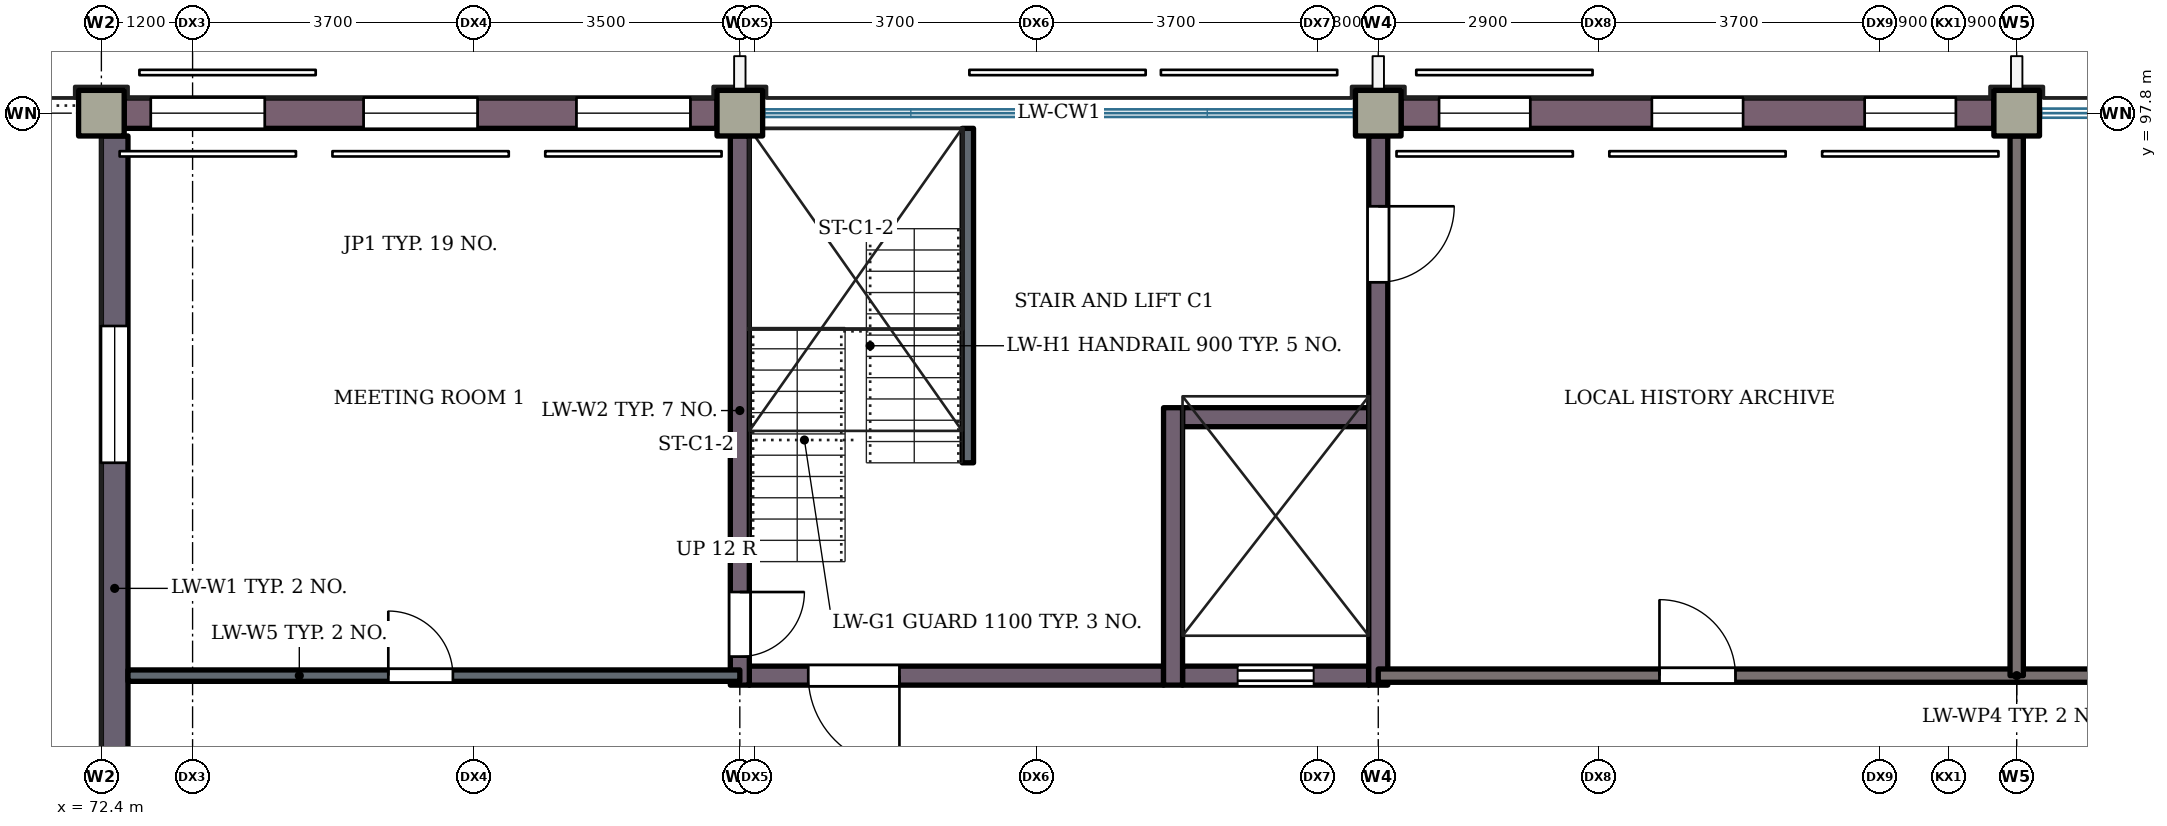
"""IFC4 building model, lengths in metres.
Left out: names, types, materials, properties, quantities, classifications, styles, units other than length and angle.
Written with IfcOpenShell. Run it as: python <this file> out.ifc"""

import sys

from ifc_helpers import new_model, si_unit, direction, frame, frame_2d, origin, origin_2d, place, context, subcontext, project, spatial, rectangle, extrude, element, fill, save


model = new_model("IFC4")
c1 = context("Model", 3, precision=1e-05, world=origin(), true_north=direction((0.0, 1.0)))
c2 = subcontext(c1, "Body", "Model", "MODEL_VIEW")
j1 = project(units=[si_unit("LENGTHUNIT", "METRE"), si_unit("PLANEANGLEUNIT", "RADIAN")], contexts=[c1])
p1 = place(None, origin())
s1 = spatial("IfcSite", under=j1, at=p1, CompositionType="ELEMENT")
p2 = place(p1, origin())
s2 = spatial("IfcBuilding", under=s1, at=p2, CompositionType="ELEMENT")
p3 = place(p2, frame((0.0, 0.0, 8.4)))
s3 = spatial("IfcBuildingStorey", under=s2, at=p3, CompositionType="ELEMENT", Elevation=8.4)
for number, where, z_axis, x_axis in (
    (1, (72.4, 97.8, 0.0), (0.0, 0.0, 1.0), (1.0, 0.0, 0.0)),
    (2, (80.8, 97.8, 0.0), (0.0, 0.0, 1.0), (1.0, 0.0, 0.0)),
    (3, (89.2, 97.8, 0.0), (0.0, 0.0, 1.0), (1.0, 0.0, 0.0)),
    (4, (97.6, 97.8, 0.0), (0.0, 0.0, 1.0), (1.0, 0.0, 0.0)),
):
    element("IfcColumn", number, at=place(p3, frame(where, z_axis=z_axis, x_axis=x_axis)), inside=s3, PredefinedType="COLUMN", context=c2, shape_type="SweptSolid", body=[
        extrude(rectangle(XDim=0.6, YDim=0.6, at=origin_2d()), origin(), (0.0, 0.0, 1.0), 4.2),
    ])
p4 = place(p3, frame((80.925, 90.4, 0.0), z_axis=(0.0, 0.0, 1.0), x_axis=(1.0, 0.0, 0.0)))
e5 = element("IfcWall", 5, at=p4, inside=s3, PredefinedType="SHEAR", context=c2, shape_type="SweptSolid", body=[
    extrude(rectangle(XDim=5.45, YDim=0.25, at=frame_2d((2.725, 0.0))), origin(), (0.0, 0.0, 1.0), 4.2),
])
p5 = place(p4, frame((0.775, 0.0, 0.0)))
e6 = element("IfcOpeningElement", 6, at=p5, cuts=e5, PredefinedType="OPENING", context=c2, shape_type="SweptSolid", body=[
    extrude(rectangle(XDim=1.2, YDim=2.1, at=frame_2d((0.6, 1.05))), frame((0.0, 0.135, 0.0), z_axis=(0.0, -1.0, 0.0), x_axis=(1.0, 0.0, 0.0)), (0.0, 0.0, 1.0), 0.27),
])
p6 = place(p3, frame((86.625, 90.4, 0.0), z_axis=(0.0, 0.0, 1.0), x_axis=(1.0, 0.0, 0.0)))
e7 = element("IfcWall", 7, at=p6, inside=s3, PredefinedType="SHEAR", context=c2, shape_type="SweptSolid", body=[
    extrude(rectangle(XDim=2.45, YDim=0.25, at=frame_2d((1.225, 0.0))), origin(), (0.0, 0.0, 1.0), 4.2),
])
p7 = place(p6, frame((0.725, 0.0, 0.0)))
e8 = element("IfcOpeningElement", 8, at=p7, cuts=e7, PredefinedType="OPENING", context=c2, shape_type="SweptSolid", body=[
    extrude(rectangle(XDim=1.0, YDim=2.1, at=frame_2d((0.5, 1.05))), frame((0.0, 0.135, 0.0), z_axis=(0.0, -1.0, 0.0), x_axis=(1.0, 0.0, 0.0)), (0.0, 0.0, 1.0), 0.27),
])
p8 = place(p3, frame((86.625, 93.8, 0.0), z_axis=(0.0, 0.0, 1.0), x_axis=(1.0, 0.0, 0.0)))
e9 = element("IfcWall", 9, at=p8, inside=s3, PredefinedType="SHEAR", context=c2, shape_type="SweptSolid", body=[
    extrude(rectangle(XDim=2.45, YDim=0.25, at=frame_2d((1.225, 0.0))), origin(), (0.0, 0.0, 1.0), 4.2),
])
p9 = place(p3, frame((72.575, 87.9, 0.0), z_axis=(0.0, 0.0, 1.0), x_axis=(0.0, 1.0, 0.0)))
e10 = element("IfcWall", 10, at=p9, inside=s3, PredefinedType="SHEAR", context=c2, shape_type="SweptSolid", body=[
    extrude(rectangle(XDim=9.6, YDim=0.35, at=frame_2d((4.8, 0.0))), origin(), (0.0, 0.0, 1.0), 4.2),
])
p10 = place(p9, frame((5.3, 0.0, 0.9)))
e11 = element("IfcOpeningElement", 11, at=p10, cuts=e10, PredefinedType="OPENING", context=c2, shape_type="SweptSolid", body=[
    extrude(rectangle(XDim=1.8, YDim=2.1, at=frame_2d((0.9, 1.05))), frame((0.0, 0.185, 0.0), z_axis=(0.0, -1.0, 0.0), x_axis=(1.0, 0.0, 0.0)), (0.0, 0.0, 1.0), 0.37),
])
p11 = place(p3, frame((80.8, 90.275, 0.0), z_axis=(0.0, 0.0, 1.0), x_axis=(0.0, 1.0, 0.0)))
e12 = element("IfcWall", 12, at=p11, inside=s3, PredefinedType="SHEAR", context=c2, shape_type="SweptSolid", body=[
    extrude(rectangle(XDim=7.225, YDim=0.25, at=frame_2d((3.613, 0.0))), origin(), (0.0, 0.0, 1.0), 4.2),
])
p12 = place(p11, frame((0.375, 0.0, 0.0)))
e13 = element("IfcOpeningElement", 13, at=p12, cuts=e12, PredefinedType="OPENING", context=c2, shape_type="SweptSolid", body=[
    extrude(rectangle(XDim=0.85, YDim=2.1, at=frame_2d((0.425, 1.05))), frame((0.0, 0.135, 0.0), z_axis=(0.0, -1.0, 0.0), x_axis=(1.0, 0.0, 0.0)), (0.0, 0.0, 1.0), 0.27),
])
p13 = place(p3, frame((86.5, 90.275, 0.0), z_axis=(0.0, 0.0, 1.0), x_axis=(0.0, 1.0, 0.0)))
e14 = element("IfcWall", 14, at=p13, inside=s3, PredefinedType="SHEAR", context=c2, shape_type="SweptSolid", body=[
    extrude(rectangle(XDim=3.65, YDim=0.25, at=frame_2d((1.825, 0.0))), origin(), (0.0, 0.0, 1.0), 4.2),
])
p14 = place(p3, frame((89.2, 90.275, 0.0), z_axis=(0.0, 0.0, 1.0), x_axis=(0.0, 1.0, 0.0)))
e15 = element("IfcWall", 15, at=p14, inside=s3, PredefinedType="SHEAR", context=c2, shape_type="SweptSolid", body=[
    extrude(rectangle(XDim=7.225, YDim=0.25, at=frame_2d((3.613, 0.0))), origin(), (0.0, 0.0, 1.0), 4.2),
])
p15 = place(p14, frame((5.3, 0.0, 0.0)))
e16 = element("IfcOpeningElement", 16, at=p15, cuts=e15, PredefinedType="OPENING", context=c2, shape_type="SweptSolid", body=[
    extrude(rectangle(XDim=1.0, YDim=2.1, at=frame_2d((0.5, 1.05))), frame((0.0, 0.135, 0.0), z_axis=(0.0, -1.0, 0.0), x_axis=(1.0, 0.0, 0.0)), (0.0, 0.0, 1.0), 0.27),
])
p16 = place(p3, frame((72.7, 97.8, 0.0), z_axis=(0.0, 0.0, 1.0), x_axis=(1.0, 0.0, 0.0)))
e17 = element("IfcWall", 17, at=p16, inside=s3, PredefinedType="SOLIDWALL", context=c2, shape_type="SweptSolid", body=[
    extrude(rectangle(XDim=7.8, YDim=0.4, at=frame_2d((3.9, 0.0))), origin(), (0.0, 0.0, 1.0), 3.32),
])
p17 = place(p16, frame((0.35, 0.0, 0.9)))
e18 = element("IfcOpeningElement", 18, at=p17, cuts=e17, PredefinedType="OPENING", context=c2, shape_type="SweptSolid", body=[
    extrude(rectangle(XDim=1.5, YDim=2.1, at=frame_2d((0.75, 1.05))), frame((0.0, 0.21, 0.0), z_axis=(0.0, -1.0, 0.0), x_axis=(1.0, 0.0, 0.0)), (0.0, 0.0, 1.0), 0.42),
])
p18 = place(p16, frame((3.15, 0.0, 0.9)))
e19 = element("IfcOpeningElement", 19, at=p18, cuts=e17, PredefinedType="OPENING", context=c2, shape_type="SweptSolid", body=[
    extrude(rectangle(XDim=1.5, YDim=2.1, at=frame_2d((0.75, 1.05))), frame((0.0, 0.21, 0.0), z_axis=(0.0, -1.0, 0.0), x_axis=(1.0, 0.0, 0.0)), (0.0, 0.0, 1.0), 0.42),
])
p19 = place(p16, frame((5.95, 0.0, 0.9)))
e20 = element("IfcOpeningElement", 20, at=p19, cuts=e17, PredefinedType="OPENING", context=c2, shape_type="SweptSolid", body=[
    extrude(rectangle(XDim=1.5, YDim=2.1, at=frame_2d((0.75, 1.05))), frame((0.0, 0.21, 0.0), z_axis=(0.0, -1.0, 0.0), x_axis=(1.0, 0.0, 0.0)), (0.0, 0.0, 1.0), 0.42),
])
p20 = place(p3, frame((89.5, 97.8, 0.0), z_axis=(0.0, 0.0, 1.0), x_axis=(1.0, 0.0, 0.0)))
e21 = element("IfcWall", 21, at=p20, inside=s3, PredefinedType="SOLIDWALL", context=c2, shape_type="SweptSolid", body=[
    extrude(rectangle(XDim=7.8, YDim=0.4, at=frame_2d((3.9, 0.0))), origin(), (0.0, 0.0, 1.0), 3.32),
])
p21 = place(p20, frame((0.5, 0.0, 1.8)))
e22 = element("IfcOpeningElement", 22, at=p21, cuts=e21, PredefinedType="OPENING", context=c2, shape_type="SweptSolid", body=[
    extrude(rectangle(XDim=1.2, YDim=1.2, at=frame_2d((0.6, 0.6))), frame((0.0, 0.21, 0.0), z_axis=(0.0, -1.0, 0.0), x_axis=(1.0, 0.0, 0.0)), (0.0, 0.0, 1.0), 0.42),
])
p22 = place(p20, frame((3.3, 0.0, 1.8)))
e23 = element("IfcOpeningElement", 23, at=p22, cuts=e21, PredefinedType="OPENING", context=c2, shape_type="SweptSolid", body=[
    extrude(rectangle(XDim=1.2, YDim=1.2, at=frame_2d((0.6, 0.6))), frame((0.0, 0.21, 0.0), z_axis=(0.0, -1.0, 0.0), x_axis=(1.0, 0.0, 0.0)), (0.0, 0.0, 1.0), 0.42),
])
p23 = place(p20, frame((6.1, 0.0, 1.8)))
e24 = element("IfcOpeningElement", 24, at=p23, cuts=e21, PredefinedType="OPENING", context=c2, shape_type="SweptSolid", body=[
    extrude(rectangle(XDim=1.2, YDim=1.2, at=frame_2d((0.6, 0.6))), frame((0.0, 0.21, 0.0), z_axis=(0.0, -1.0, 0.0), x_axis=(1.0, 0.0, 0.0)), (0.0, 0.0, 1.0), 0.42),
])
p24 = place(p3, frame((89.2, 90.4, 0.0), z_axis=(0.0, 0.0, 1.0), x_axis=(1.0, 0.0, 0.0)))
e25 = element("IfcWall", 25, at=p24, inside=s3, PredefinedType="PARTITIONING", context=c2, shape_type="SweptSolid", body=[
    extrude(rectangle(XDim=16.8, YDim=0.175, at=frame_2d((8.4, 0.0))), origin(), (0.0, 0.0, 1.0), 3.92),
])
p25 = place(p24, frame((3.7, 0.0, 0.0)))
e26 = element("IfcOpeningElement", 26, at=p25, cuts=e25, PredefinedType="OPENING", context=c2, shape_type="SweptSolid", body=[
    extrude(rectangle(XDim=1.0, YDim=2.1, at=frame_2d((0.5, 1.05))), frame((0.0, 0.097, 0.0), z_axis=(0.0, -1.0, 0.0), x_axis=(1.0, 0.0, 0.0)), (0.0, 0.0, 1.0), 0.195),
])
p26 = place(p24, frame((12.1, 0.0, 0.0)))
e27 = element("IfcOpeningElement", 27, at=p26, cuts=e25, PredefinedType="OPENING", context=c2, shape_type="SweptSolid", body=[
    extrude(rectangle(XDim=1.0, YDim=2.1, at=frame_2d((0.5, 1.05))), frame((0.0, 0.097, 0.0), z_axis=(0.0, -1.0, 0.0), x_axis=(1.0, 0.0, 0.0)), (0.0, 0.0, 1.0), 0.195),
])
p27 = place(p3, frame((72.75, 90.4, 0.0), z_axis=(0.0, 0.0, 1.0), x_axis=(1.0, 0.0, 0.0)))
e28 = element("IfcWall", 28, at=p27, inside=s3, PredefinedType="PARTITIONING", context=c2, shape_type="SweptSolid", body=[
    extrude(rectangle(XDim=8.05, YDim=0.15, at=frame_2d((4.025, 0.0))), origin(), (0.0, 0.0, 1.0), 3.92),
])
p28 = place(p27, frame((3.425, 0.0, 0.0)))
e29 = element("IfcOpeningElement", 29, at=p28, cuts=e28, PredefinedType="OPENING", context=c2, shape_type="SweptSolid", body=[
    extrude(rectangle(XDim=0.85, YDim=2.1, at=frame_2d((0.425, 1.05))), frame((0.0, 0.085, 0.0), z_axis=(0.0, -1.0, 0.0), x_axis=(1.0, 0.0, 0.0)), (0.0, 0.0, 1.0), 0.17),
])
p29 = place(p3, frame((97.6, 90.4, 0.0), z_axis=(0.0, 0.0, 1.0), x_axis=(0.0, 1.0, 0.0)))
e30 = element("IfcWall", 30, at=p29, inside=s3, PredefinedType="PARTITIONING", context=c2, shape_type="SweptSolid", body=[
    extrude(rectangle(XDim=7.1, YDim=0.175, at=frame_2d((3.55, 0.0))), origin(), (0.0, 0.0, 1.0), 3.02),
])
p30 = place(p3, frame((83.8, 93.2, 0.0), z_axis=(0.0, 0.0, 1.0), x_axis=(0.0, 1.0, 0.0)))
e31 = element("IfcWall", 31, at=p30, inside=s3, PredefinedType="PARTITIONING", context=c2, shape_type="SweptSolid", body=[
    extrude(rectangle(XDim=4.4, YDim=0.15, at=frame_2d((2.2, 0.0))), origin(), (0.0, 0.0, 1.0), 3.92),
])
p31 = place(p17, origin())
e32 = element("IfcWindow", 32, at=p31, inside=s3, PartitioningType="SINGLE_PANEL", PredefinedType="WINDOW", context=c2, shape_type="SweptSolid", body=[
    extrude(rectangle(XDim=1.5, YDim=2.1, at=frame_2d((0.75, 1.05))), frame((0.0, 0.03, 0.0), z_axis=(0.0, -1.0, 0.0), x_axis=(1.0, 0.0, 0.0)), (0.0, 0.0, 1.0), 0.06),
])
fill(e18, e32)
p32 = place(p18, origin())
e33 = element("IfcWindow", 33, at=p32, inside=s3, PartitioningType="SINGLE_PANEL", PredefinedType="WINDOW", context=c2, shape_type="SweptSolid", body=[
    extrude(rectangle(XDim=1.5, YDim=2.1, at=frame_2d((0.75, 1.05))), frame((0.0, 0.03, 0.0), z_axis=(0.0, -1.0, 0.0), x_axis=(1.0, 0.0, 0.0)), (0.0, 0.0, 1.0), 0.06),
])
fill(e19, e33)
p33 = place(p19, origin())
e34 = element("IfcWindow", 34, at=p33, inside=s3, PartitioningType="SINGLE_PANEL", PredefinedType="WINDOW", context=c2, shape_type="SweptSolid", body=[
    extrude(rectangle(XDim=1.5, YDim=2.1, at=frame_2d((0.75, 1.05))), frame((0.0, 0.03, 0.0), z_axis=(0.0, -1.0, 0.0), x_axis=(1.0, 0.0, 0.0)), (0.0, 0.0, 1.0), 0.06),
])
fill(e20, e34)
p34 = place(p21, origin())
e35 = element("IfcWindow", 35, at=p34, inside=s3, PartitioningType="SINGLE_PANEL", PredefinedType="WINDOW", context=c2, shape_type="SweptSolid", body=[
    extrude(rectangle(XDim=1.2, YDim=1.2, at=frame_2d((0.6, 0.6))), frame((0.0, 0.03, 0.0), z_axis=(0.0, -1.0, 0.0), x_axis=(1.0, 0.0, 0.0)), (0.0, 0.0, 1.0), 0.06),
])
fill(e22, e35)
p35 = place(p22, origin())
e36 = element("IfcWindow", 36, at=p35, inside=s3, PartitioningType="SINGLE_PANEL", PredefinedType="WINDOW", context=c2, shape_type="SweptSolid", body=[
    extrude(rectangle(XDim=1.2, YDim=1.2, at=frame_2d((0.6, 0.6))), frame((0.0, 0.03, 0.0), z_axis=(0.0, -1.0, 0.0), x_axis=(1.0, 0.0, 0.0)), (0.0, 0.0, 1.0), 0.06),
])
fill(e23, e36)
p36 = place(p23, origin())
e37 = element("IfcWindow", 37, at=p36, inside=s3, PartitioningType="SINGLE_PANEL", PredefinedType="WINDOW", context=c2, shape_type="SweptSolid", body=[
    extrude(rectangle(XDim=1.2, YDim=1.2, at=frame_2d((0.6, 0.6))), frame((0.0, 0.03, 0.0), z_axis=(0.0, -1.0, 0.0), x_axis=(1.0, 0.0, 0.0)), (0.0, 0.0, 1.0), 0.06),
])
fill(e24, e37)
p37 = place(p10, origin())
e38 = element("IfcWindow", 38, at=p37, inside=s3, PartitioningType="SINGLE_PANEL", PredefinedType="WINDOW", context=c2, shape_type="SweptSolid", body=[
    extrude(rectangle(XDim=1.8, YDim=2.1, at=frame_2d((0.9, 1.05))), frame((0.0, 0.03, 0.0), z_axis=(0.0, -1.0, 0.0), x_axis=(1.0, 0.0, 0.0)), (0.0, 0.0, 1.0), 0.06),
])
fill(e11, e38)
p38 = place(p28, origin())
e39 = element("IfcDoor", 39, at=p38, inside=s3, OperationType="SINGLE_SWING_LEFT", PredefinedType="DOOR", context=c2, shape_type="SweptSolid", body=[
    extrude(rectangle(XDim=0.85, YDim=2.1, at=frame_2d((0.425, 1.05))), frame((0.0, 0.025, 0.0), z_axis=(0.0, -1.0, 0.0), x_axis=(1.0, 0.0, 0.0)), (0.0, 0.0, 1.0), 0.05),
])
fill(e29, e39)
p39 = place(p12, origin())
e40 = element("IfcDoor", 40, at=p39, inside=s3, OperationType="SINGLE_SWING_RIGHT", PredefinedType="DOOR", context=c2, shape_type="SweptSolid", body=[
    extrude(rectangle(XDim=0.85, YDim=2.1, at=frame_2d((0.425, 1.05))), frame((0.0, 0.025, 0.0), z_axis=(0.0, -1.0, 0.0), x_axis=(1.0, 0.0, 0.0)), (0.0, 0.0, 1.0), 0.05),
])
fill(e13, e40)
p40 = place(p25, origin())
e41 = element("IfcDoor", 41, at=p40, inside=s3, OperationType="SINGLE_SWING_LEFT", PredefinedType="DOOR", context=c2, shape_type="SweptSolid", body=[
    extrude(rectangle(XDim=1.0, YDim=2.1, at=frame_2d((0.5, 1.05))), frame((0.0, 0.025, 0.0), z_axis=(0.0, -1.0, 0.0), x_axis=(1.0, 0.0, 0.0)), (0.0, 0.0, 1.0), 0.05),
])
fill(e26, e41)
p41 = place(p15, origin())
e42 = element("IfcDoor", 42, at=p41, inside=s3, OperationType="SINGLE_SWING_RIGHT", PredefinedType="DOOR", context=c2, shape_type="SweptSolid", body=[
    extrude(rectangle(XDim=1.0, YDim=2.1, at=frame_2d((0.5, 1.05))), frame((0.0, 0.025, 0.0), z_axis=(0.0, -1.0, 0.0), x_axis=(1.0, 0.0, 0.0)), (0.0, 0.0, 1.0), 0.05),
])
fill(e16, e42)
p42 = place(p5, origin())
e43 = element("IfcDoor", 43, at=p42, inside=s3, OperationType="SINGLE_SWING_RIGHT", PredefinedType="DOOR", context=c2, shape_type="SweptSolid", body=[
    extrude(rectangle(XDim=1.2, YDim=2.1, at=frame_2d((0.6, 1.05))), frame((0.0, 0.025, 0.0), z_axis=(0.0, -1.0, 0.0), x_axis=(1.0, 0.0, 0.0)), (0.0, 0.0, 1.0), 0.05),
])
fill(e6, e43)
p43 = place(p7, origin())
e44 = element("IfcDoor", 44, at=p43, inside=s3, OperationType="SLIDING_TO_LEFT", PredefinedType="DOOR", context=c2, shape_type="SweptSolid", body=[
    extrude(rectangle(XDim=1.0, YDim=2.1, at=frame_2d((0.5, 1.05))), frame((0.0, 0.025, 0.0), z_axis=(0.0, -1.0, 0.0), x_axis=(1.0, 0.0, 0.0)), (0.0, 0.0, 1.0), 0.05),
])
fill(e8, e44)
save(model, sys.argv[1])
